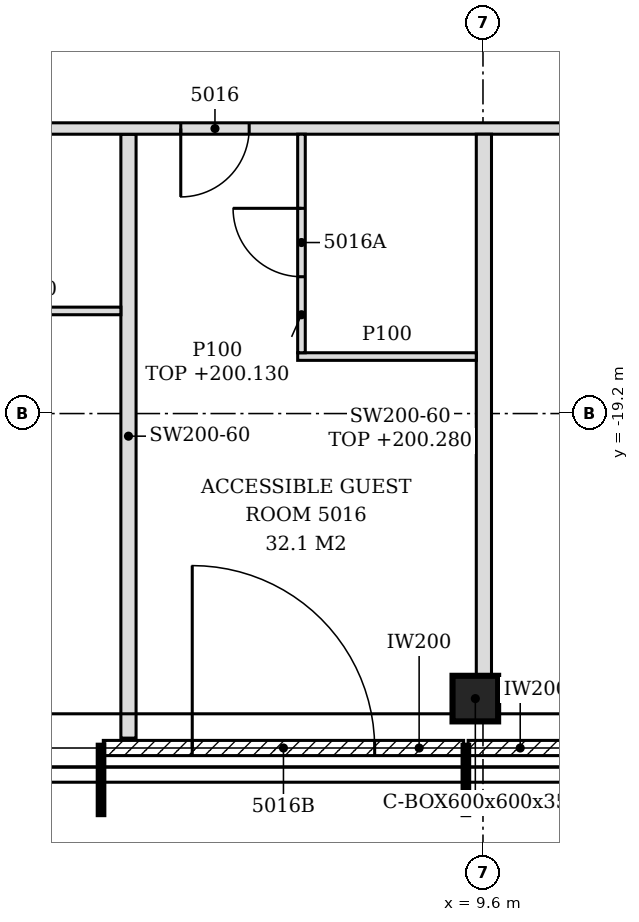
"""IFC4 building model, lengths in metres.
Left out: names, types, materials, properties, quantities, classifications, styles, units other than length and angle.
Written with IfcOpenShell. Run it as: python <this file> out.ifc"""

import sys

from ifc_helpers import new_model, si_unit, direction, frame, frame_2d, origin, origin_2d, place, context, subcontext, project, spatial, polyline, rectangle, hollow_rectangle, outline, extrude, clip, halfspace, element, fill, save


model = new_model("IFC4")
c1 = context("Model", 3, precision=1e-05, world=origin(), true_north=direction((0.0, 1.0)))
c2 = subcontext(c1, "Body", "Model", "MODEL_VIEW")
j1 = project(units=[si_unit("LENGTHUNIT", "METRE"), si_unit("PLANEANGLEUNIT", "RADIAN")], contexts=[c1])
p1 = place(None, origin())
s1 = spatial("IfcSite", under=j1, at=p1, CompositionType="ELEMENT")
p2 = place(p1, origin())
s2 = spatial("IfcBuilding", under=s1, at=p2, CompositionType="ELEMENT")
p3 = place(p2, frame((0.0, 0.0, 197.4)))
s3 = spatial("IfcBuildingStorey", under=s2, at=p3, CompositionType="ELEMENT", Elevation=197.4)
p4 = place(p3, frame((9.499, -22.95, -0.15), z_axis=(0.062349577264, -0.041588926266, 0.997187490609), x_axis=(0.554908399644, 0.831911454426, 0.0)))
e1 = element("IfcColumn", 1, at=p4, inside=s3, PredefinedType="COLUMN", context=c2, shape_type="Clipping", body=[
    clip(clip(extrude(hollow_rectangle(XDim=0.6, YDim=0.6, WallThickness=0.035, at=origin_2d()), origin(), (0.0, 0.0, 1.0), 3.61), halfspace(frame((0.0, 0.0, 0.022), z_axis=(0.0, 0.0, 1.0), x_axis=(1.0, 0.0, 0.0)), True)), halfspace(frame((0.0, 0.0, 3.599), z_axis=(0.0, 0.0, 1.0), x_axis=(1.0, 0.0, 0.0)), False)),
])
p5 = place(p3, frame((4.605, -23.6, 0.0), z_axis=(0.0, 0.0, 1.0), x_axis=(1.0, 0.0, 0.0)))
e2 = element("IfcWall", 2, at=p5, inside=s3, PredefinedType="NOTDEFINED", context=c2, shape_type="SweptSolid", body=[
    extrude(rectangle(XDim=4.74, YDim=0.2, at=frame_2d((2.37, 0.0))), origin(), (0.0, 0.0, 1.0), 3.45),
])
p6 = place(p5, frame((1.17, 0.0, 0.0)))
e3 = element("IfcOpeningElement", 3, at=p6, cuts=e2, PredefinedType="OPENING", context=c2, shape_type="SweptSolid", body=[
    extrude(rectangle(XDim=2.4, YDim=2.4, at=frame_2d((1.2, 1.2))), frame((0.0, 0.11, 0.0), z_axis=(0.0, -1.0, 0.0), x_axis=(1.0, 0.0, 0.0)), (0.0, 0.0, 1.0), 0.22),
])
p7 = place(p3, frame((9.405, -23.6, 0.0), z_axis=(0.0, 0.0, 1.0), x_axis=(1.0, 0.0, 0.0)))
e4 = element("IfcWall", 4, at=p7, inside=s3, PredefinedType="NOTDEFINED", context=c2, shape_type="SweptSolid", body=[
    extrude(rectangle(XDim=4.74, YDim=0.2, at=frame_2d((2.37, 0.0))), origin(), (0.0, 0.0, 1.0), 3.45),
])
p8 = place(p7, frame((1.37, 0.0, 0.0)))
e5 = element("IfcOpeningElement", 5, at=p8, cuts=e4, PredefinedType="OPENING", context=c2, shape_type="SweptSolid", body=[
    extrude(rectangle(XDim=2.4, YDim=2.4, at=frame_2d((1.2, 1.2))), frame((0.0, 0.11, 0.0), z_axis=(0.0, -1.0, 0.0), x_axis=(1.0, 0.0, 0.0)), (0.0, 0.0, 1.0), 0.22),
])
p9 = place(p3, frame((4.936, -23.47, 0.0), z_axis=(0.0, 0.0, 1.0), x_axis=(0.0, 1.0, 0.0)))
e6 = element("IfcWall", 6, at=p9, inside=s3, PredefinedType="PARTITIONING", context=c2, shape_type="SweptSolid", body=[
    extrude(outline(polyline([(0.0, 0.0), (7.945, 0.0), (7.945, 3.45), (4.37, 3.45), (4.368, 2.93), (4.17, 2.93), (4.168, 3.45), (0.52, 3.45), (0.518, 2.93), (0.22, 2.93), (0.218, 3.45), (0.0, 3.45), (0.0, 0.0)])), frame((0.0, 0.1, 0.0), z_axis=(0.0, -1.0, 0.0), x_axis=(1.0, 0.0, 0.0)), (0.0, 0.0, 1.0), 0.2),
])
p10 = place(p3, frame((9.612, -22.684, 0.0), z_axis=(0.0, 0.0, 1.0), x_axis=(0.0, 1.0, 0.0)))
e7 = element("IfcWall", 7, at=p10, inside=s3, PredefinedType="PARTITIONING", context=c2, shape_type="SweptSolid", body=[
    extrude(outline(polyline([(0.086, 0.0), (7.158, 0.0), (7.158, 0.863), (7.158, 1.725), (7.158, 2.588), (7.158, 2.88), (0.024, 2.88), (0.036, 2.588), (0.072, 1.725), (0.086, 0.863), (0.086, 0.0)])), frame((0.0, 0.1, 0.0), z_axis=(0.0, -1.0, 0.0), x_axis=(1.0, 0.0, 0.0)), (0.0, 0.0, 1.0), 0.2),
])
p11 = place(p3, frame((7.162, -18.45, 0.0), z_axis=(0.0, 0.0, 1.0), x_axis=(1.0, 0.0, 0.0)))
e8 = element("IfcWall", 8, at=p11, inside=s3, PredefinedType="PARTITIONING", context=c2, shape_type="SweptSolid", body=[
    extrude(outline(polyline([(0.0, 0.0), (2.35, 0.0), (2.35, 3.45), (0.188, 3.45), (0.186, 2.73), (0.0, 2.73), (0.0, 0.0)])), frame((0.0, 0.05, 0.0), z_axis=(0.0, -1.0, 0.0), x_axis=(1.0, 0.0, 0.0)), (0.0, 0.0, 1.0), 0.1),
])
p12 = place(p3, frame((7.212, -18.4, 0.0), z_axis=(0.0, 0.0, 1.0), x_axis=(0.0, 1.0, 0.0)))
e9 = element("IfcWall", 9, at=p12, inside=s3, PredefinedType="PARTITIONING", context=c2, shape_type="SweptSolid", body=[
    extrude(rectangle(XDim=2.875, YDim=0.1, at=frame_2d((1.438, 0.0))), origin(), (0.0, 0.0, 1.0), 2.73),
])
p13 = place(p12, frame((1.0, 0.0, 0.0)))
e10 = element("IfcOpeningElement", 10, at=p13, cuts=e9, PredefinedType="OPENING", context=c2, shape_type="SweptSolid", body=[
    extrude(rectangle(XDim=0.9, YDim=2.1, at=frame_2d((0.45, 1.05))), frame((0.0, 0.06, 0.0), z_axis=(0.0, -1.0, 0.0), x_axis=(1.0, 0.0, 0.0)), (0.0, 0.0, 1.0), 0.12),
])
p14 = place(p3, frame((2.486, -17.85, 0.0), z_axis=(0.0, 0.0, 1.0), x_axis=(1.0, 0.0, 0.0)))
e11 = element("IfcWall", 11, at=p14, inside=s3, PredefinedType="PARTITIONING", context=c2, shape_type="SweptSolid", body=[
    extrude(rectangle(XDim=2.35, YDim=0.1, at=frame_2d((1.175, 0.0))), origin(), (0.0, 0.0, 1.0), 3.45),
])
p15 = place(p3, frame((-1.25, -15.45, 0.0), z_axis=(0.0, 0.0, 1.0), x_axis=(1.0, 0.0, 0.0)))
e12 = element("IfcWall", 12, at=p15, inside=s3, PredefinedType="PARTITIONING", context=c2, shape_type="SweptSolid", body=[
    extrude(outline(polyline([(0.0, 0.0), (26.346, 0.0), (26.346, 3.45), (20.6, 3.45), (20.598, 2.73), (20.3, 2.73), (20.298, 3.45), (8.6, 3.45), (8.598, 2.73), (8.3, 2.73), (8.298, 3.45), (0.0, 3.45), (0.0, 0.0)])), frame((0.0, 0.075, 0.0), z_axis=(0.0, -1.0, 0.0), x_axis=(1.0, 0.0, 0.0)), (0.0, 0.0, 1.0), 0.15),
])
p16 = place(p15, frame((22.101, 0.0, 0.0)))
e13 = element("IfcOpeningElement", 13, at=p16, cuts=e12, PredefinedType="OPENING", context=c2, shape_type="SweptSolid", body=[
    extrude(rectangle(XDim=0.9, YDim=2.1, at=frame_2d((0.45, 1.05))), frame((0.0, 0.085, 0.0), z_axis=(0.0, -1.0, 0.0), x_axis=(1.0, 0.0, 0.0)), (0.0, 0.0, 1.0), 0.17),
])
p17 = place(p15, frame((1.496, 0.0, 0.0)))
e14 = element("IfcOpeningElement", 14, at=p17, cuts=e12, PredefinedType="OPENING", context=c2, shape_type="SweptSolid", body=[
    extrude(rectangle(XDim=0.9, YDim=2.1, at=frame_2d((0.45, 1.05))), frame((0.0, 0.085, 0.0), z_axis=(0.0, -1.0, 0.0), x_axis=(1.0, 0.0, 0.0)), (0.0, 0.0, 1.0), 0.17),
])
p18 = place(p15, frame((6.874, 0.0, 0.0)))
e15 = element("IfcOpeningElement", 15, at=p18, cuts=e12, PredefinedType="OPENING", context=c2, shape_type="SweptSolid", body=[
    extrude(rectangle(XDim=0.9, YDim=2.1, at=frame_2d((0.45, 1.05))), frame((0.0, 0.085, 0.0), z_axis=(0.0, -1.0, 0.0), x_axis=(1.0, 0.0, 0.0)), (0.0, 0.0, 1.0), 0.17),
])
p19 = place(p15, frame((12.75, 0.0, 0.0)))
e16 = element("IfcOpeningElement", 16, at=p19, cuts=e12, PredefinedType="OPENING", context=c2, shape_type="SweptSolid", body=[
    extrude(rectangle(XDim=0.9, YDim=2.1, at=frame_2d((0.45, 1.05))), frame((0.0, 0.085, 0.0), z_axis=(0.0, -1.0, 0.0), x_axis=(1.0, 0.0, 0.0)), (0.0, 0.0, 1.0), 0.17),
])
p20 = place(p6, origin())
e17 = element("IfcDoor", 17, at=p20, inside=s3, OperationType="SINGLE_SWING_LEFT", PredefinedType="DOOR", context=c2, shape_type="SweptSolid", body=[
    extrude(rectangle(XDim=2.4, YDim=2.4, at=frame_2d((1.2, 1.2))), frame((0.0, 0.025, 0.0), z_axis=(0.0, -1.0, 0.0), x_axis=(1.0, 0.0, 0.0)), (0.0, 0.0, 1.0), 0.05),
])
fill(e3, e17)
p21 = place(p18, frame((0.9, 0.0, 0.0), z_axis=(0.0, 0.0, 1.0), x_axis=(-1.0, 0.0, 0.0)))
e18 = element("IfcDoor", 18, at=p21, inside=s3, OperationType="SINGLE_SWING_RIGHT", PredefinedType="DOOR", context=c2, shape_type="SweptSolid", body=[
    extrude(rectangle(XDim=0.9, YDim=2.1, at=frame_2d((0.45, 1.05))), frame((0.0, 0.025, 0.0), z_axis=(0.0, -1.0, 0.0), x_axis=(1.0, 0.0, 0.0)), (0.0, 0.0, 1.0), 0.05),
])
fill(e15, e18)
p22 = place(p13, origin())
e19 = element("IfcDoor", 19, at=p22, inside=s3, OperationType="SINGLE_SWING_RIGHT", PredefinedType="DOOR", context=c2, shape_type="SweptSolid", body=[
    extrude(rectangle(XDim=0.9, YDim=2.1, at=frame_2d((0.45, 1.05))), frame((0.0, 0.025, 0.0), z_axis=(0.0, -1.0, 0.0), x_axis=(1.0, 0.0, 0.0)), (0.0, 0.0, 1.0), 0.05),
])
fill(e10, e19)
save(model, sys.argv[1])
